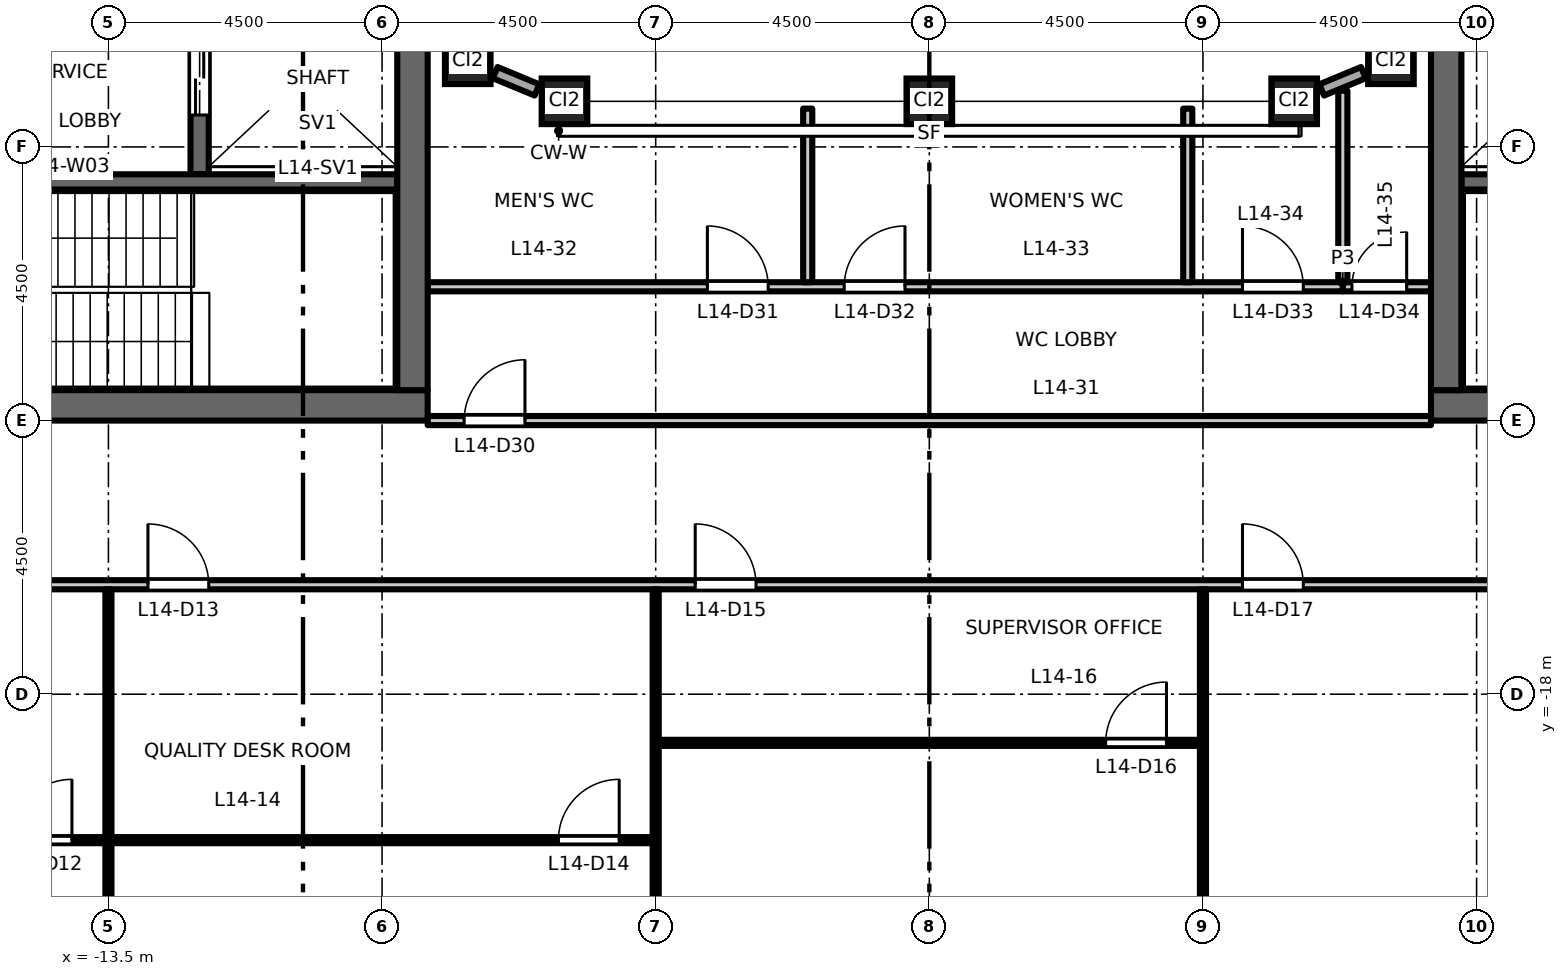
"""IFC4 building model, lengths in metres.
Left out: names, types, materials, properties, quantities, classifications, styles, units other than length and angle.
Written with IfcOpenShell. Run it as: python <this file> out.ifc"""

import sys

from ifc_helpers import new_model, si_unit, direction, frame, frame_2d, origin, origin_2d, place, context, subcontext, project, spatial, rectangle, hollow_rectangle, extrude, element, fill, save


model = new_model("IFC4")
c1 = context("Model", 3, precision=1e-05, world=origin(), true_north=direction((0.0, 1.0)))
c2 = subcontext(c1, "Body", "Model", "MODEL_VIEW")
j1 = project(units=[si_unit("LENGTHUNIT", "METRE"), si_unit("PLANEANGLEUNIT", "RADIAN")], contexts=[c1])
p1 = place(None, origin())
s1 = spatial("IfcSite", under=j1, at=p1, CompositionType="ELEMENT")
p2 = place(p1, origin())
s2 = spatial("IfcBuilding", under=s1, at=p2, CompositionType="ELEMENT")
p3 = place(p2, frame((0.0, 0.0, 67.2)))
s3 = spatial("IfcBuildingStorey", under=s2, at=p3, CompositionType="ELEMENT", Elevation=67.2)
for number, where, z_axis, x_axis in (
    (1, (-7.591, -7.591, 0.0), (0.0, 0.0, 1.0), (1.0, 0.0, 0.0)),
    (2, (-6.0, -8.25, 0.0), (0.0, 0.0, 1.0), (1.0, 0.0, 0.0)),
    (3, (0.0, -8.25, 0.0), (0.0, 0.0, 1.0), (1.0, 0.0, 0.0)),
    (4, (6.0, -8.25, 0.0), (0.0, 0.0, 1.0), (1.0, 0.0, 0.0)),
    (5, (7.591, -7.591, 0.0), (0.0, 0.0, 1.0), (1.0, 0.0, 0.0)),
):
    element("IfcColumn", number, at=place(p3, frame(where, z_axis=z_axis, x_axis=x_axis)), inside=s3, PredefinedType="COLUMN", context=c2, shape_type="SweptSolid", body=[
        extrude(hollow_rectangle(XDim=0.75, YDim=0.75, WallThickness=0.045, at=origin_2d()), origin(), (0.0, 0.0, 1.0), 4.5),
    ])
p4 = place(p3, frame((-12.0, -9.45, 0.0), z_axis=(0.0, 0.0, 1.0), x_axis=(0.0, 1.0, 0.0)))
e6 = element("IfcWall", 6, at=p4, inside=s3, PredefinedType="SHEAR", context=c2, shape_type="SweptSolid", body=[
    extrude(rectangle(XDim=18.9, YDim=0.3, at=frame_2d((9.45, 0.0))), origin(), (0.0, 0.0, 1.0), 4.35),
])
p5 = place(p4, frame((3.625, 0.0, 0.0)))
e7 = element("IfcOpeningElement", 7, at=p5, cuts=e6, PredefinedType="OPENING", context=c2, shape_type="SweptSolid", body=[
    extrude(rectangle(XDim=1.1, YDim=2.1, at=frame_2d((0.55, 1.05))), frame((0.0, 0.16, 0.0), z_axis=(0.0, -1.0, 0.0), x_axis=(1.0, 0.0, 0.0)), (0.0, 0.0, 1.0), 0.32),
])
p6 = place(p4, frame((6.775, 0.0, 0.0)))
e8 = element("IfcOpeningElement", 8, at=p6, cuts=e6, PredefinedType="OPENING", context=c2, shape_type="SweptSolid", body=[
    extrude(rectangle(XDim=1.1, YDim=2.1, at=frame_2d((0.55, 1.05))), frame((0.0, 0.16, 0.0), z_axis=(0.0, -1.0, 0.0), x_axis=(1.0, 0.0, 0.0)), (0.0, 0.0, 1.0), 0.32),
])
p7 = place(p4, frame((9.925, 0.0, 0.0)))
e9 = element("IfcOpeningElement", 9, at=p7, cuts=e6, PredefinedType="OPENING", context=c2, shape_type="SweptSolid", body=[
    extrude(rectangle(XDim=1.1, YDim=2.1, at=frame_2d((0.55, 1.05))), frame((0.0, 0.16, 0.0), z_axis=(0.0, -1.0, 0.0), x_axis=(1.0, 0.0, 0.0)), (0.0, 0.0, 1.0), 0.32),
])
p8 = place(p4, frame((13.075, 0.0, 0.0)))
e10 = element("IfcOpeningElement", 10, at=p8, cuts=e6, PredefinedType="OPENING", context=c2, shape_type="SweptSolid", body=[
    extrude(rectangle(XDim=1.1, YDim=2.1, at=frame_2d((0.55, 1.05))), frame((0.0, 0.16, 0.0), z_axis=(0.0, -1.0, 0.0), x_axis=(1.0, 0.0, 0.0)), (0.0, 0.0, 1.0), 0.32),
])
p9 = place(p4, frame((16.725, 0.0, 0.0)))
e11 = element("IfcOpeningElement", 11, at=p9, cuts=e6, PredefinedType="OPENING", context=c2, shape_type="SweptSolid", body=[
    extrude(rectangle(XDim=1.2, YDim=2.1, at=frame_2d((0.6, 1.05))), frame((0.0, 0.16, 0.0), z_axis=(0.0, -1.0, 0.0), x_axis=(1.0, 0.0, 0.0)), (0.0, 0.0, 1.0), 0.32),
])
p10 = place(p4, frame((0.975, 0.0, 0.0)))
e12 = element("IfcOpeningElement", 12, at=p10, cuts=e6, PredefinedType="OPENING", context=c2, shape_type="SweptSolid", body=[
    extrude(rectangle(XDim=1.2, YDim=2.1, at=frame_2d((0.6, 1.05))), frame((0.0, 0.16, 0.0), z_axis=(0.0, -1.0, 0.0), x_axis=(1.0, 0.0, 0.0)), (0.0, 0.0, 1.0), 0.32),
])
p11 = place(p3, frame((-8.75, -9.575, 0.0), z_axis=(0.0, 0.0, 1.0), x_axis=(-1.0, 0.0, 0.0)))
e13 = element("IfcWall", 13, at=p11, inside=s3, PredefinedType="SHEAR", context=c2, shape_type="SweptSolid", body=[
    extrude(rectangle(XDim=8.0, YDim=0.25, at=frame_2d((4.0, 0.0))), origin(), (0.0, 0.0, 1.0), 4.35),
])
p12 = place(p11, frame((6.65, 0.0, 0.0)))
e14 = element("IfcOpeningElement", 14, at=p12, cuts=e13, PredefinedType="OPENING", context=c2, shape_type="SweptSolid", body=[
    extrude(rectangle(XDim=1.1, YDim=2.1, at=frame_2d((0.55, 1.05))), frame((0.0, 0.135, 0.0), z_axis=(0.0, -1.0, 0.0), x_axis=(1.0, 0.0, 0.0)), (0.0, 0.0, 1.0), 0.27),
])
p13 = place(p3, frame((-8.25, -13.25, 0.0), z_axis=(0.0, 0.0, 1.0), x_axis=(-1.0, 0.0, 0.0)))
e15 = element("IfcWall", 15, at=p13, inside=s3, PredefinedType="SHEAR", context=c2, shape_type="SweptSolid", body=[
    extrude(rectangle(XDim=13.5, YDim=0.5, at=frame_2d((6.75, 0.0))), origin(), (0.0, 0.0, 1.0), 4.35),
])
p14 = place(p3, frame((-8.5, -13.0, 0.0), z_axis=(0.0, 0.0, 1.0), x_axis=(0.0, 1.0, 0.0)))
e16 = element("IfcWall", 16, at=p14, inside=s3, PredefinedType="SHEAR", context=c2, shape_type="SweptSolid", body=[
    extrude(rectangle(XDim=26.0, YDim=0.5, at=frame_2d((13.0, 0.0))), origin(), (0.0, 0.0, 1.0), 4.35),
])
p15 = place(p3, frame((8.75, -9.575, 0.0), z_axis=(0.0, 0.0, 1.0), x_axis=(1.0, 0.0, 0.0)))
e17 = element("IfcWall", 17, at=p15, inside=s3, PredefinedType="SHEAR", context=c2, shape_type="SweptSolid", body=[
    extrude(rectangle(XDim=8.0, YDim=0.25, at=frame_2d((4.0, 0.0))), origin(), (0.0, 0.0, 1.0), 4.35),
])
p16 = place(p15, frame((6.65, 0.0, 0.0)))
e18 = element("IfcOpeningElement", 18, at=p16, cuts=e17, PredefinedType="OPENING", context=c2, shape_type="SweptSolid", body=[
    extrude(rectangle(XDim=1.1, YDim=2.1, at=frame_2d((0.55, 1.05))), frame((0.0, 0.135, 0.0), z_axis=(0.0, -1.0, 0.0), x_axis=(1.0, 0.0, 0.0)), (0.0, 0.0, 1.0), 0.27),
])
p17 = place(p3, frame((8.25, -13.25, 0.0), z_axis=(0.0, 0.0, 1.0), x_axis=(1.0, 0.0, 0.0)))
e19 = element("IfcWall", 19, at=p17, inside=s3, PredefinedType="SHEAR", context=c2, shape_type="SweptSolid", body=[
    extrude(rectangle(XDim=13.5, YDim=0.5, at=frame_2d((6.75, 0.0))), origin(), (0.0, 0.0, 1.0), 4.35),
])
p18 = place(p3, frame((8.5, -13.0, 0.0), z_axis=(0.0, 0.0, 1.0), x_axis=(0.0, 1.0, 0.0)))
e20 = element("IfcWall", 20, at=p18, inside=s3, PredefinedType="SHEAR", context=c2, shape_type="SweptSolid", body=[
    extrude(rectangle(XDim=26.0, YDim=0.5, at=frame_2d((13.0, 0.0))), origin(), (0.0, 0.0, 1.0), 4.35),
])
for number, where, z_axis, x_axis in (
    (21, (6.453, -8.062, 0.0), (0.0, 0.0, 1.0), (0.924, 0.383, 0.0)),
    (22, (-7.138, -7.779, 0.0), (0.0, 0.0, 1.0), (0.924, -0.383, 0.0)),
):
    element("IfcWall", number, at=place(p3, frame(where, z_axis=z_axis, x_axis=x_axis)), inside=s3, PredefinedType="STANDARD", context=c2, shape_type="SweptSolid", body=[
        extrude(rectangle(XDim=0.742, YDim=0.2, at=frame_2d((0.371, 0.0))), origin(), (0.0, 0.0, 1.0), 3.73),
    ])
p19 = place(p3, frame((-22.45, -20.4, 0.0), z_axis=(0.0, 0.0, 1.0), x_axis=(1.0, 0.0, 0.0)))
e23 = element("IfcWall", 23, at=p19, inside=s3, PredefinedType="PARTITIONING", context=c2, shape_type="SweptSolid", body=[
    extrude(rectangle(XDim=17.9, YDim=0.1, at=frame_2d((8.95, 0.0))), origin(), (0.0, 0.0, 1.0), 4.35),
])
p20 = place(p19, frame((7.35, 0.0, 0.0)))
e24 = element("IfcOpeningElement", 24, at=p20, cuts=e23, PredefinedType="OPENING", context=c2, shape_type="SweptSolid", body=[
    extrude(rectangle(XDim=1.0, YDim=2.1, at=frame_2d((0.5, 1.05))), frame((0.0, 0.06, 0.0), z_axis=(0.0, -1.0, 0.0), x_axis=(1.0, 0.0, 0.0)), (0.0, 0.0, 1.0), 0.12),
])
p21 = place(p19, frame((16.35, 0.0, 0.0)))
e25 = element("IfcOpeningElement", 25, at=p21, cuts=e23, PredefinedType="OPENING", context=c2, shape_type="SweptSolid", body=[
    extrude(rectangle(XDim=1.0, YDim=2.1, at=frame_2d((0.5, 1.05))), frame((0.0, 0.06, 0.0), z_axis=(0.0, -1.0, 0.0), x_axis=(1.0, 0.0, 0.0)), (0.0, 0.0, 1.0), 0.12),
])
p22 = place(p3, frame((-4.45, -18.8, 0.0), z_axis=(0.0, 0.0, 1.0), x_axis=(1.0, 0.0, 0.0)))
e26 = element("IfcWall", 26, at=p22, inside=s3, PredefinedType="PARTITIONING", context=c2, shape_type="SweptSolid", body=[
    extrude(rectangle(XDim=8.9, YDim=0.1, at=frame_2d((4.45, 0.0))), origin(), (0.0, 0.0, 1.0), 4.35),
])
p23 = place(p22, frame((7.35, 0.0, 0.0)))
e27 = element("IfcOpeningElement", 27, at=p23, cuts=e26, PredefinedType="OPENING", context=c2, shape_type="SweptSolid", body=[
    extrude(rectangle(XDim=1.0, YDim=2.1, at=frame_2d((0.5, 1.05))), frame((0.0, 0.06, 0.0), z_axis=(0.0, -1.0, 0.0), x_axis=(1.0, 0.0, 0.0)), (0.0, 0.0, 1.0), 0.12),
])
p24 = place(p3, frame((-30.51, -16.2, 0.0), z_axis=(0.0, 0.0, 1.0), x_axis=(1.0, 0.0, 0.0)))
e28 = element("IfcWall", 28, at=p24, inside=s3, PredefinedType="PARTITIONING", context=c2, shape_type="SweptSolid", body=[
    extrude(rectangle(XDim=61.02, YDim=0.15, at=frame_2d((30.51, 0.0))), origin(), (0.0, 0.0, 1.0), 4.35),
])
p25 = place(p24, frame((8.66, 0.0, 0.0)))
e29 = element("IfcOpeningElement", 29, at=p25, cuts=e28, PredefinedType="OPENING", context=c2, shape_type="SweptSolid", body=[
    extrude(rectangle(XDim=1.0, YDim=2.1, at=frame_2d((0.5, 1.05))), frame((0.0, 0.085, 0.0), z_axis=(0.0, -1.0, 0.0), x_axis=(1.0, 0.0, 0.0)), (0.0, 0.0, 1.0), 0.17),
])
p26 = place(p24, frame((17.66, 0.0, 0.0)))
e30 = element("IfcOpeningElement", 30, at=p26, cuts=e28, PredefinedType="OPENING", context=c2, shape_type="SweptSolid", body=[
    extrude(rectangle(XDim=1.0, YDim=2.1, at=frame_2d((0.5, 1.05))), frame((0.0, 0.085, 0.0), z_axis=(0.0, -1.0, 0.0), x_axis=(1.0, 0.0, 0.0)), (0.0, 0.0, 1.0), 0.17),
])
p27 = place(p24, frame((26.66, 0.0, 0.0)))
e31 = element("IfcOpeningElement", 31, at=p27, cuts=e28, PredefinedType="OPENING", context=c2, shape_type="SweptSolid", body=[
    extrude(rectangle(XDim=1.0, YDim=2.1, at=frame_2d((0.5, 1.05))), frame((0.0, 0.085, 0.0), z_axis=(0.0, -1.0, 0.0), x_axis=(1.0, 0.0, 0.0)), (0.0, 0.0, 1.0), 0.17),
])
p28 = place(p24, frame((35.66, 0.0, 0.0)))
e32 = element("IfcOpeningElement", 32, at=p28, cuts=e28, PredefinedType="OPENING", context=c2, shape_type="SweptSolid", body=[
    extrude(rectangle(XDim=1.0, YDim=2.1, at=frame_2d((0.5, 1.05))), frame((0.0, 0.085, 0.0), z_axis=(0.0, -1.0, 0.0), x_axis=(1.0, 0.0, 0.0)), (0.0, 0.0, 1.0), 0.17),
])
p29 = place(p24, frame((51.41, 0.0, 0.0)))
e33 = element("IfcOpeningElement", 33, at=p29, cuts=e28, PredefinedType="OPENING", context=c2, shape_type="SweptSolid", body=[
    extrude(rectangle(XDim=1.0, YDim=2.1, at=frame_2d((0.5, 1.05))), frame((0.0, 0.085, 0.0), z_axis=(0.0, -1.0, 0.0), x_axis=(1.0, 0.0, 0.0)), (0.0, 0.0, 1.0), 0.17),
])
p30 = place(p24, frame((6.4, 0.0, 0.0)))
e34 = element("IfcOpeningElement", 34, at=p30, cuts=e28, PredefinedType="OPENING", context=c2, shape_type="SweptSolid", body=[
    extrude(rectangle(XDim=1.0, YDim=2.1, at=frame_2d((0.5, 1.05))), frame((0.0, 0.085, 0.0), z_axis=(0.0, -1.0, 0.0), x_axis=(1.0, 0.0, 0.0)), (0.0, 0.0, 1.0), 0.17),
])
p31 = place(p24, frame((53.66, 0.0, 0.0)))
e35 = element("IfcOpeningElement", 35, at=p31, cuts=e28, PredefinedType="OPENING", context=c2, shape_type="SweptSolid", body=[
    extrude(rectangle(XDim=1.0, YDim=2.1, at=frame_2d((0.5, 1.05))), frame((0.0, 0.085, 0.0), z_axis=(0.0, -1.0, 0.0), x_axis=(1.0, 0.0, 0.0)), (0.0, 0.0, 1.0), 0.17),
])
p32 = place(p3, frame((-8.25, -13.5, 0.0), z_axis=(0.0, 0.0, 1.0), x_axis=(1.0, 0.0, 0.0)))
e36 = element("IfcWall", 36, at=p32, inside=s3, PredefinedType="PARTITIONING", context=c2, shape_type="SweptSolid", body=[
    extrude(rectangle(XDim=16.5, YDim=0.15, at=frame_2d((8.25, 0.0))), origin(), (0.0, 0.0, 1.0), 3.85),
])
p33 = place(p32, frame((0.6, 0.0, 0.0)))
e37 = element("IfcOpeningElement", 37, at=p33, cuts=e36, PredefinedType="OPENING", context=c2, shape_type="SweptSolid", body=[
    extrude(rectangle(XDim=1.0, YDim=2.1, at=frame_2d((0.5, 1.05))), frame((0.0, 0.085, 0.0), z_axis=(0.0, -1.0, 0.0), x_axis=(1.0, 0.0, 0.0)), (0.0, 0.0, 1.0), 0.17),
])
p34 = place(p3, frame((-8.25, -11.3, 0.0), z_axis=(0.0, 0.0, 1.0), x_axis=(1.0, 0.0, 0.0)))
e38 = element("IfcWall", 38, at=p34, inside=s3, PredefinedType="PARTITIONING", context=c2, shape_type="SweptSolid", body=[
    extrude(rectangle(XDim=15.05, YDim=0.15, at=frame_2d((7.525, 0.0))), origin(), (0.0, 0.0, 1.0), 4.35),
])
p35 = place(p34, frame((4.6, 0.0, 0.0)))
e39 = element("IfcOpeningElement", 39, at=p35, cuts=e38, PredefinedType="OPENING", context=c2, shape_type="SweptSolid", body=[
    extrude(rectangle(XDim=1.0, YDim=2.1, at=frame_2d((0.5, 1.05))), frame((0.0, 0.085, 0.0), z_axis=(0.0, -1.0, 0.0), x_axis=(1.0, 0.0, 0.0)), (0.0, 0.0, 1.0), 0.17),
])
p36 = place(p34, frame((6.85, 0.0, 0.0)))
e40 = element("IfcOpeningElement", 40, at=p36, cuts=e38, PredefinedType="OPENING", context=c2, shape_type="SweptSolid", body=[
    extrude(rectangle(XDim=1.0, YDim=2.1, at=frame_2d((0.5, 1.05))), frame((0.0, 0.085, 0.0), z_axis=(0.0, -1.0, 0.0), x_axis=(1.0, 0.0, 0.0)), (0.0, 0.0, 1.0), 0.17),
])
p37 = place(p34, frame((13.4, 0.0, 0.0)))
e41 = element("IfcOpeningElement", 41, at=p37, cuts=e38, PredefinedType="OPENING", context=c2, shape_type="SweptSolid", body=[
    extrude(rectangle(XDim=1.0, YDim=2.1, at=frame_2d((0.5, 1.05))), frame((0.0, 0.085, 0.0), z_axis=(0.0, -1.0, 0.0), x_axis=(1.0, 0.0, 0.0)), (0.0, 0.0, 1.0), 0.17),
])
p38 = place(p3, frame((6.8, -11.3, 0.0), z_axis=(0.0, 0.0, 1.0), x_axis=(1.0, 0.0, 0.0)))
e42 = element("IfcWall", 42, at=p38, inside=s3, PredefinedType="PARTITIONING", context=c2, shape_type="SweptSolid", body=[
    extrude(rectangle(XDim=1.45, YDim=0.15, at=frame_2d((0.725, 0.0))), origin(), (0.0, 0.0, 1.0), 4.35),
])
p39 = place(p38, frame((0.15, 0.0, 0.0)))
e43 = element("IfcOpeningElement", 43, at=p39, cuts=e42, PredefinedType="OPENING", context=c2, shape_type="SweptSolid", body=[
    extrude(rectangle(XDim=0.9, YDim=2.1, at=frame_2d((0.45, 1.05))), frame((0.0, 0.085, 0.0), z_axis=(0.0, -1.0, 0.0), x_axis=(1.0, 0.0, 0.0)), (0.0, 0.0, 1.0), 0.17),
])
p40 = place(p3, frame((-13.5, -30.51, 0.0), z_axis=(0.0, 0.0, 1.0), x_axis=(0.0, 1.0, 0.0)))
e44 = element("IfcWall", 44, at=p40, inside=s3, PredefinedType="PARTITIONING", context=c2, shape_type="SweptSolid", body=[
    extrude(rectangle(XDim=10.06, YDim=0.1, at=frame_2d((5.03, 0.0))), origin(), (0.0, 0.0, 1.0), 3.35),
])
p41 = place(p3, frame((-13.5, -20.35, 0.0), z_axis=(0.0, 0.0, 1.0), x_axis=(0.0, 1.0, 0.0)))
e45 = element("IfcWall", 45, at=p41, inside=s3, PredefinedType="PARTITIONING", context=c2, shape_type="SweptSolid", body=[
    extrude(rectangle(XDim=4.075, YDim=0.1, at=frame_2d((2.038, 0.0))), origin(), (0.0, 0.0, 1.0), 3.35),
])
p42 = place(p3, frame((-4.5, -30.51, 0.0), z_axis=(0.0, 0.0, 1.0), x_axis=(0.0, 1.0, 0.0)))
e46 = element("IfcWall", 46, at=p42, inside=s3, PredefinedType="PARTITIONING", context=c2, shape_type="SweptSolid", body=[
    extrude(rectangle(XDim=14.235, YDim=0.1, at=frame_2d((7.118, 0.0))), origin(), (0.0, 0.0, 1.0), 3.35),
])
for number, where, z_axis, x_axis in (
    (47, (-2.0, -11.225, 0.0), (0.0, 0.0, 1.0), (0.0, 1.0, 0.0)),
    (48, (4.25, -11.225, 0.0), (0.0, 0.0, 1.0), (0.0, 1.0, 0.0)),
):
    element("IfcWall", number, at=place(p3, frame(where, z_axis=z_axis, x_axis=x_axis)), inside=s3, PredefinedType="PARTITIONING", context=c2, shape_type="SweptSolid", body=[
        extrude(rectangle(XDim=2.855, YDim=0.15, at=frame_2d((1.427, 0.0))), origin(), (0.0, 0.0, 1.0), 4.35),
    ])
p43 = place(p3, frame((4.5, -30.51, 0.0), z_axis=(0.0, 0.0, 1.0), x_axis=(0.0, 1.0, 0.0)))
e49 = element("IfcWall", 49, at=p43, inside=s3, PredefinedType="PARTITIONING", context=c2, shape_type="SweptSolid", body=[
    extrude(rectangle(XDim=14.235, YDim=0.1, at=frame_2d((7.118, 0.0))), origin(), (0.0, 0.0, 1.0), 3.35),
])
p44 = place(p3, frame((6.8, -11.225, 0.0), z_axis=(0.0, 0.0, 1.0), x_axis=(0.0, 1.0, 0.0)))
e50 = element("IfcWall", 50, at=p44, inside=s3, PredefinedType="PARTITIONING", context=c2, shape_type="SweptSolid", body=[
    extrude(rectangle(XDim=3.151, YDim=0.15, at=frame_2d((1.576, 0.0))), origin(), (0.0, 0.0, 1.0), 4.35),
])
p45 = place(p10, origin())
e51 = element("IfcDoor", 51, at=p45, inside=s3, OperationType="DOUBLE_DOOR_SLIDING", PredefinedType="DOOR", context=c2, shape_type="SweptSolid", body=[
    extrude(rectangle(XDim=1.2, YDim=2.1, at=frame_2d((0.6, 1.05))), frame((0.0, 0.025, 0.0), z_axis=(0.0, -1.0, 0.0), x_axis=(1.0, 0.0, 0.0)), (0.0, 0.0, 1.0), 0.05),
])
fill(e12, e51)
p46 = place(p20, origin())
e52 = element("IfcDoor", 52, at=p46, inside=s3, OperationType="SINGLE_SWING_RIGHT", PredefinedType="DOOR", context=c2, shape_type="SweptSolid", body=[
    extrude(rectangle(XDim=1.0, YDim=2.1, at=frame_2d((0.5, 1.05))), frame((0.0, 0.025, 0.0), z_axis=(0.0, -1.0, 0.0), x_axis=(1.0, 0.0, 0.0)), (0.0, 0.0, 1.0), 0.05),
])
fill(e24, e52)
p47 = place(p26, origin())
e53 = element("IfcDoor", 53, at=p47, inside=s3, OperationType="SINGLE_SWING_LEFT", PredefinedType="DOOR", context=c2, shape_type="SweptSolid", body=[
    extrude(rectangle(XDim=1.0, YDim=2.1, at=frame_2d((0.5, 1.05))), frame((0.0, 0.025, 0.0), z_axis=(0.0, -1.0, 0.0), x_axis=(1.0, 0.0, 0.0)), (0.0, 0.0, 1.0), 0.05),
])
fill(e30, e53)
p48 = place(p21, origin())
e54 = element("IfcDoor", 54, at=p48, inside=s3, OperationType="SINGLE_SWING_RIGHT", PredefinedType="DOOR", context=c2, shape_type="SweptSolid", body=[
    extrude(rectangle(XDim=1.0, YDim=2.1, at=frame_2d((0.5, 1.05))), frame((0.0, 0.025, 0.0), z_axis=(0.0, -1.0, 0.0), x_axis=(1.0, 0.0, 0.0)), (0.0, 0.0, 1.0), 0.05),
])
fill(e25, e54)
p49 = place(p27, origin())
e55 = element("IfcDoor", 55, at=p49, inside=s3, OperationType="SINGLE_SWING_LEFT", PredefinedType="DOOR", context=c2, shape_type="SweptSolid", body=[
    extrude(rectangle(XDim=1.0, YDim=2.1, at=frame_2d((0.5, 1.05))), frame((0.0, 0.025, 0.0), z_axis=(0.0, -1.0, 0.0), x_axis=(1.0, 0.0, 0.0)), (0.0, 0.0, 1.0), 0.05),
])
fill(e31, e55)
p50 = place(p23, origin())
e56 = element("IfcDoor", 56, at=p50, inside=s3, OperationType="SINGLE_SWING_RIGHT", PredefinedType="DOOR", context=c2, shape_type="SweptSolid", body=[
    extrude(rectangle(XDim=1.0, YDim=2.1, at=frame_2d((0.5, 1.05))), frame((0.0, 0.025, 0.0), z_axis=(0.0, -1.0, 0.0), x_axis=(1.0, 0.0, 0.0)), (0.0, 0.0, 1.0), 0.05),
])
fill(e27, e56)
p51 = place(p28, origin())
e57 = element("IfcDoor", 57, at=p51, inside=s3, OperationType="SINGLE_SWING_LEFT", PredefinedType="DOOR", context=c2, shape_type="SweptSolid", body=[
    extrude(rectangle(XDim=1.0, YDim=2.1, at=frame_2d((0.5, 1.05))), frame((0.0, 0.025, 0.0), z_axis=(0.0, -1.0, 0.0), x_axis=(1.0, 0.0, 0.0)), (0.0, 0.0, 1.0), 0.05),
])
fill(e32, e57)
p52 = place(p33, origin())
e58 = element("IfcDoor", 58, at=p52, inside=s3, OperationType="SINGLE_SWING_RIGHT", PredefinedType="DOOR", context=c2, shape_type="SweptSolid", body=[
    extrude(rectangle(XDim=1.0, YDim=2.1, at=frame_2d((0.5, 1.05))), frame((0.0, 0.025, 0.0), z_axis=(0.0, -1.0, 0.0), x_axis=(1.0, 0.0, 0.0)), (0.0, 0.0, 1.0), 0.05),
])
fill(e37, e58)
p53 = place(p35, origin())
e59 = element("IfcDoor", 59, at=p53, inside=s3, OperationType="SINGLE_SWING_LEFT", PredefinedType="DOOR", context=c2, shape_type="SweptSolid", body=[
    extrude(rectangle(XDim=1.0, YDim=2.1, at=frame_2d((0.5, 1.05))), frame((0.0, 0.025, 0.0), z_axis=(0.0, -1.0, 0.0), x_axis=(1.0, 0.0, 0.0)), (0.0, 0.0, 1.0), 0.05),
])
fill(e39, e59)
p54 = place(p36, origin())
e60 = element("IfcDoor", 60, at=p54, inside=s3, OperationType="SINGLE_SWING_RIGHT", PredefinedType="DOOR", context=c2, shape_type="SweptSolid", body=[
    extrude(rectangle(XDim=1.0, YDim=2.1, at=frame_2d((0.5, 1.05))), frame((0.0, 0.025, 0.0), z_axis=(0.0, -1.0, 0.0), x_axis=(1.0, 0.0, 0.0)), (0.0, 0.0, 1.0), 0.05),
])
fill(e40, e60)
p55 = place(p37, origin())
e61 = element("IfcDoor", 61, at=p55, inside=s3, OperationType="SINGLE_SWING_LEFT", PredefinedType="DOOR", context=c2, shape_type="SweptSolid", body=[
    extrude(rectangle(XDim=1.0, YDim=2.1, at=frame_2d((0.5, 1.05))), frame((0.0, 0.025, 0.0), z_axis=(0.0, -1.0, 0.0), x_axis=(1.0, 0.0, 0.0)), (0.0, 0.0, 1.0), 0.05),
])
fill(e41, e61)
p56 = place(p39, origin())
e62 = element("IfcDoor", 62, at=p56, inside=s3, OperationType="SINGLE_SWING_RIGHT", PredefinedType="DOOR", context=c2, shape_type="SweptSolid", body=[
    extrude(rectangle(XDim=0.9, YDim=2.1, at=frame_2d((0.45, 1.05))), frame((0.0, 0.025, 0.0), z_axis=(0.0, -1.0, 0.0), x_axis=(1.0, 0.0, 0.0)), (0.0, 0.0, 1.0), 0.05),
])
fill(e43, e62)
save(model, sys.argv[1])
